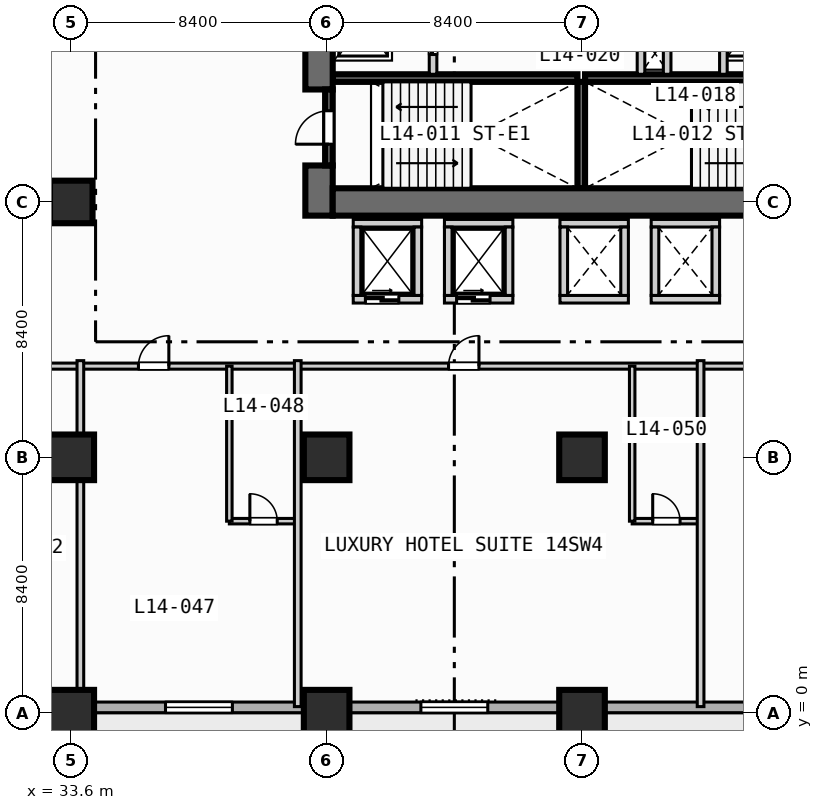
"""IFC4 building model, lengths in metres.
Left out: names, types, materials, properties, quantities, classifications, styles, units other than length and angle.
Written with IfcOpenShell. Run it as: python <this file> out.ifc"""

import sys

from ifc_helpers import new_model, si_unit, direction, frame, frame_2d, origin, origin_2d, place, context, subcontext, project, spatial, rectangle, extrude, element, fill, save


model = new_model("IFC4")
c1 = context("Model", 3, precision=1e-05, world=origin(), true_north=direction((0.0, 1.0)))
c2 = subcontext(c1, "Body", "Model", "MODEL_VIEW")
j1 = project(units=[si_unit("LENGTHUNIT", "METRE"), si_unit("PLANEANGLEUNIT", "RADIAN")], contexts=[c1])
p1 = place(None, origin())
s1 = spatial("IfcSite", under=j1, at=p1, CompositionType="ELEMENT")
p2 = place(p1, origin())
s2 = spatial("IfcBuilding", under=s1, at=p2, CompositionType="ELEMENT")
p3 = place(p2, frame((0.0, 0.0, 62.4)))
s3 = spatial("IfcBuildingStorey", under=s2, at=p3, CompositionType="ELEMENT", Elevation=62.4)
for number, where, z_axis, x_axis in (
    (1, (42.2, 20.875, 0.0), (0.0, 0.0, 1.0), (1.0, 0.0, 0.0)),
    (2, (50.5, 20.875, 0.0), (0.0, 0.0, 1.0), (1.0, 0.0, 0.0)),
):
    element("IfcWall", number, at=place(p3, frame(where, z_axis=z_axis, x_axis=x_axis)), inside=s3, PredefinedType="SOLIDWALL", context=c2, shape_type="SweptSolid", body=[
        extrude(rectangle(XDim=8.05, YDim=0.25, at=frame_2d((4.025, 0.0))), origin(), (0.0, 0.0, 1.0), 3.55),
    ])
p4 = place(p3, frame((50.375, 17.25, 0.0), z_axis=(0.0, 0.0, 1.0), x_axis=(0.0, 1.0, 0.0)))
e3 = element("IfcWall", 3, at=p4, inside=s3, PredefinedType="SOLIDWALL", context=c2, shape_type="SweptSolid", body=[
    extrude(rectangle(XDim=3.5, YDim=0.25, at=frame_2d((1.75, 0.0))), origin(), (0.0, 0.0, 1.0), 3.55),
])
p5 = place(p3, frame((41.75, 16.35, 0.0), z_axis=(0.0, 0.0, 1.0), x_axis=(0.0, 1.0, 0.0)))
e4 = element("IfcWall", 4, at=p5, inside=s3, PredefinedType="SHEAR", context=c2, shape_type="SweptSolid", body=[
    extrude(rectangle(XDim=1.65, YDim=0.9, at=frame_2d((0.825, 0.0))), origin(), (0.0, 0.0, 1.0), 3.55),
])
p6 = place(p3, frame((41.75, 20.5, 0.0), z_axis=(0.0, 0.0, 1.0), x_axis=(0.0, 1.0, 0.0)))
e5 = element("IfcWall", 5, at=p6, inside=s3, PredefinedType="SHEAR", context=c2, shape_type="SweptSolid", body=[
    extrude(rectangle(XDim=5.15, YDim=0.9, at=frame_2d((2.575, 0.0))), origin(), (0.0, 0.0, 1.0), 3.55),
])
p7 = place(p3, frame((42.2, 16.8, 0.0), z_axis=(0.0, 0.0, 1.0), x_axis=(1.0, 0.0, 0.0)))
e6 = element("IfcWall", 6, at=p7, inside=s3, PredefinedType="SHEAR", context=c2, shape_type="SweptSolid", body=[
    extrude(rectangle(XDim=16.35, YDim=0.9, at=frame_2d((8.175, 0.0))), origin(), (0.0, 0.0, 1.0), 3.55),
])
for number, where, z_axis, x_axis in (
    (7, (33.6, 0.0, 0.0), (0.0, 0.0, 1.0), (1.0, 0.0, 0.0)),
    (8, (33.6, 8.4, 0.0), (0.0, 0.0, 1.0), (1.0, 0.0, 0.0)),
):
    element("IfcColumn", number, at=place(p3, frame(where, z_axis=z_axis, x_axis=x_axis)), inside=s3, PredefinedType="COLUMN", context=c2, shape_type="SweptSolid", body=[
        extrude(rectangle(XDim=1.5, YDim=1.5, at=origin_2d()), origin(), (0.0, 0.0, 1.0), 3.8),
    ])
p8 = place(p3, frame((33.6, 16.8, 0.0), z_axis=(0.0, 0.0, 1.0), x_axis=(1.0, 0.0, 0.0)))
e9 = element("IfcColumn", 9, at=p8, inside=s3, PredefinedType="COLUMN", context=c2, shape_type="SweptSolid", body=[
    extrude(rectangle(XDim=1.4, YDim=1.4, at=origin_2d()), origin(), (0.0, 0.0, 1.0), 3.8),
])
for number, where, z_axis, x_axis in (
    (10, (42.0, 0.0, 0.0), (0.0, 0.0, 1.0), (1.0, 0.0, 0.0)),
    (11, (42.0, 8.4, 0.0), (0.0, 0.0, 1.0), (1.0, 0.0, 0.0)),
    (12, (50.4, 0.0, 0.0), (0.0, 0.0, 1.0), (1.0, 0.0, 0.0)),
    (13, (50.4, 8.4, 0.0), (0.0, 0.0, 1.0), (1.0, 0.0, 0.0)),
):
    element("IfcColumn", number, at=place(p3, frame(where, z_axis=z_axis, x_axis=x_axis)), inside=s3, PredefinedType="COLUMN", context=c2, shape_type="SweptSolid", body=[
        extrude(rectangle(XDim=1.5, YDim=1.5, at=origin_2d()), origin(), (0.0, 0.0, 1.0), 3.8),
    ])
p9 = place(p3, frame((89.225, 0.175, 0.0), z_axis=(0.0, 0.0, 1.0), x_axis=(-1.0, 0.0, 0.0)))
e14 = element("IfcWall", 14, at=p9, inside=s3, PredefinedType="STANDARD", context=c2, shape_type="SweptSolid", body=[
    extrude(rectangle(XDim=86.05, YDim=0.35, at=frame_2d((43.025, 0.0))), origin(), (0.0, 0.0, 1.0), 3.55),
])
p10 = place(p9, frame((69.025, 0.0, 0.0)))
e15 = element("IfcOpeningElement", 15, at=p10, cuts=e14, PredefinedType="OPENING", context=c2, shape_type="SweptSolid", body=[
    extrude(rectangle(XDim=1.4, YDim=2.2, at=frame_2d((0.7, 1.1))), frame((0.0, 0.185, 0.0), z_axis=(0.0, -1.0, 0.0), x_axis=(1.0, 0.0, 0.0)), (0.0, 0.0, 1.0), 0.37),
])
p11 = place(p9, frame((58.725, 0.0, 0.85)))
e16 = element("IfcOpeningElement", 16, at=p11, cuts=e14, PredefinedType="OPENING", context=c2, shape_type="SweptSolid", body=[
    extrude(rectangle(XDim=2.2, YDim=1.8, at=frame_2d((1.1, 0.9))), frame((0.0, 0.185, 0.0), z_axis=(0.0, -1.0, 0.0), x_axis=(1.0, 0.0, 0.0)), (0.0, 0.0, 1.0), 0.37),
])
p12 = place(p9, frame((50.325, 0.0, 0.85)))
e17 = element("IfcOpeningElement", 17, at=p12, cuts=e14, PredefinedType="OPENING", context=c2, shape_type="SweptSolid", body=[
    extrude(rectangle(XDim=2.2, YDim=1.8, at=frame_2d((1.1, 0.9))), frame((0.0, 0.185, 0.0), z_axis=(0.0, -1.0, 0.0), x_axis=(1.0, 0.0, 0.0)), (0.0, 0.0, 1.0), 0.37),
])
p13 = place(p9, frame((41.925, 0.0, 0.85)))
e18 = element("IfcOpeningElement", 18, at=p13, cuts=e14, PredefinedType="OPENING", context=c2, shape_type="SweptSolid", body=[
    extrude(rectangle(XDim=2.2, YDim=1.8, at=frame_2d((1.1, 0.9))), frame((0.0, 0.185, 0.0), z_axis=(0.0, -1.0, 0.0), x_axis=(1.0, 0.0, 0.0)), (0.0, 0.0, 1.0), 0.37),
])
p14 = place(p9, frame((27.775, 0.0, 0.85)))
e19 = element("IfcOpeningElement", 19, at=p14, cuts=e14, PredefinedType="OPENING", context=c2, shape_type="SweptSolid", body=[
    extrude(rectangle(XDim=1.8, YDim=1.8, at=frame_2d((0.9, 0.9))), frame((0.0, 0.185, 0.0), z_axis=(0.0, -1.0, 0.0), x_axis=(1.0, 0.0, 0.0)), (0.0, 0.0, 1.0), 0.37),
])
p15 = place(p3, frame((42.075, 18.0, 0.0), z_axis=(0.0, 0.0, 1.0), x_axis=(0.0, 1.0, 0.0)))
e20 = element("IfcWall", 20, at=p15, inside=s3, PredefinedType="SOLIDWALL", context=c2, shape_type="SweptSolid", body=[
    extrude(rectangle(XDim=2.5, YDim=0.25, at=frame_2d((1.25, 0.0))), origin(), (0.0, 0.0, 1.0), 3.55),
])
p16 = place(p15, frame((0.7, 0.0, 0.0)))
e21 = element("IfcOpeningElement", 21, at=p16, cuts=e20, PredefinedType="OPENING", context=c2, shape_type="SweptSolid", body=[
    extrude(rectangle(XDim=1.1, YDim=2.15, at=frame_2d((0.55, 1.075))), frame((0.0, 0.135, 0.0), z_axis=(0.0, -1.0, 0.0), x_axis=(1.0, 0.0, 0.0)), (0.0, 0.0, 1.0), 0.27),
])
p17 = place(p3, frame((45.5, 21.0, 0.0), z_axis=(0.0, 0.0, 1.0), x_axis=(0.0, 1.0, 0.0)))
e22 = element("IfcWall", 22, at=p17, inside=s3, PredefinedType="SOLIDWALL", context=c2, shape_type="SweptSolid", body=[
    extrude(rectangle(XDim=4.15, YDim=0.25, at=frame_2d((2.075, 0.0))), origin(), (0.0, 0.0, 1.0), 3.55),
])
p18 = place(p17, frame((0.65, 0.0, 0.0)))
e23 = element("IfcOpeningElement", 23, at=p18, cuts=e22, PredefinedType="OPENING", context=c2, shape_type="SweptSolid", body=[
    extrude(rectangle(XDim=1.1, YDim=2.15, at=frame_2d((0.55, 1.075))), frame((0.0, 0.135, 0.0), z_axis=(0.0, -1.0, 0.0), x_axis=(1.0, 0.0, 0.0)), (0.0, 0.0, 1.0), 0.27),
])
p19 = place(p3, frame((52.34, 21.0, 0.0), z_axis=(0.0, 0.0, 1.0), x_axis=(0.0, 1.0, 0.0)))
e24 = element("IfcWall", 24, at=p19, inside=s3, PredefinedType="SOLIDWALL", context=c2, shape_type="SweptSolid", body=[
    extrude(rectangle(XDim=3.75, YDim=0.25, at=frame_2d((1.875, 0.0))), origin(), (0.0, 0.0, 1.0), 3.55),
])
p20 = place(p3, frame((55.05, 21.0, 0.0), z_axis=(0.0, 0.0, 1.0), x_axis=(0.0, 1.0, 0.0)))
e25 = element("IfcWall", 25, at=p20, inside=s3, PredefinedType="SOLIDWALL", context=c2, shape_type="SweptSolid", body=[
    extrude(rectangle(XDim=4.15, YDim=0.25, at=frame_2d((2.075, 0.0))), origin(), (0.0, 0.0, 1.0), 3.55),
])
p21 = place(p20, frame((1.85, 0.0, 0.0)))
e26 = element("IfcOpeningElement", 26, at=p21, cuts=e25, PredefinedType="OPENING", context=c2, shape_type="SweptSolid", body=[
    extrude(rectangle(XDim=1.1, YDim=2.15, at=frame_2d((0.55, 1.075))), frame((0.0, 0.135, 0.0), z_axis=(0.0, -1.0, 0.0), x_axis=(1.0, 0.0, 0.0)), (0.0, 0.0, 1.0), 0.27),
])
p22 = place(p3, frame((53.2, 21.0, 0.0), z_axis=(0.0, 0.0, 1.0), x_axis=(0.0, 1.0, 0.0)))
e27 = element("IfcWall", 27, at=p22, inside=s3, PredefinedType="SOLIDWALL", context=c2, shape_type="SweptSolid", body=[
    extrude(rectangle(XDim=1.3, YDim=0.25, at=frame_2d((0.65, 0.0))), origin(), (0.0, 0.0, 1.0), 3.55),
])
p23 = place(p3, frame((42.875, 13.6, 0.0), z_axis=(0.0, 0.0, 1.0), x_axis=(1.0, 0.0, 0.0)))
e28 = element("IfcWall", 28, at=p23, inside=s3, PredefinedType="SOLIDWALL", context=c2, shape_type="SweptSolid", body=[
    extrude(rectangle(XDim=2.25, YDim=0.25, at=frame_2d((1.125, 0.0))), origin(), (0.0, 0.0, 1.0), 3.55),
])
p24 = place(p23, frame((0.4, 0.0, 0.0)))
e29 = element("IfcOpeningElement", 29, at=p24, cuts=e28, PredefinedType="OPENING", context=c2, shape_type="SweptSolid", body=[
    extrude(rectangle(XDim=1.1, YDim=2.15, at=frame_2d((0.55, 1.075))), frame((0.0, 0.135, 0.0), z_axis=(0.0, -1.0, 0.0), x_axis=(1.0, 0.0, 0.0)), (0.0, 0.0, 1.0), 0.27),
])
for number, where, z_axis, x_axis in (
    (30, (42.875, 16.1, 0.0), (0.0, 0.0, 1.0), (1.0, 0.0, 0.0)),
    (31, (43.0, 13.725, 0.0), (0.0, 0.0, 1.0), (0.0, 1.0, 0.0)),
    (32, (45.0, 13.725, 0.0), (0.0, 0.0, 1.0), (0.0, 1.0, 0.0)),
):
    element("IfcWall", number, at=place(p3, frame(where, z_axis=z_axis, x_axis=x_axis)), inside=s3, PredefinedType="SOLIDWALL", context=c2, shape_type="SweptSolid", body=[
        extrude(rectangle(XDim=2.25, YDim=0.25, at=frame_2d((1.125, 0.0))), origin(), (0.0, 0.0, 1.0), 3.55),
    ])
p25 = place(p3, frame((45.875, 13.6, 0.0), z_axis=(0.0, 0.0, 1.0), x_axis=(1.0, 0.0, 0.0)))
e33 = element("IfcWall", 33, at=p25, inside=s3, PredefinedType="SOLIDWALL", context=c2, shape_type="SweptSolid", body=[
    extrude(rectangle(XDim=2.25, YDim=0.25, at=frame_2d((1.125, 0.0))), origin(), (0.0, 0.0, 1.0), 3.55),
])
p26 = place(p25, frame((0.4, 0.0, 0.0)))
e34 = element("IfcOpeningElement", 34, at=p26, cuts=e33, PredefinedType="OPENING", context=c2, shape_type="SweptSolid", body=[
    extrude(rectangle(XDim=1.1, YDim=2.15, at=frame_2d((0.55, 1.075))), frame((0.0, 0.135, 0.0), z_axis=(0.0, -1.0, 0.0), x_axis=(1.0, 0.0, 0.0)), (0.0, 0.0, 1.0), 0.27),
])
for number, where, z_axis, x_axis in (
    (35, (45.875, 16.1, 0.0), (0.0, 0.0, 1.0), (1.0, 0.0, 0.0)),
    (36, (46.0, 13.725, 0.0), (0.0, 0.0, 1.0), (0.0, 1.0, 0.0)),
    (37, (48.0, 13.725, 0.0), (0.0, 0.0, 1.0), (0.0, 1.0, 0.0)),
    (38, (49.675, 13.6, 0.0), (0.0, 0.0, 1.0), (1.0, 0.0, 0.0)),
    (39, (49.675, 16.1, 0.0), (0.0, 0.0, 1.0), (1.0, 0.0, 0.0)),
    (40, (49.8, 13.725, 0.0), (0.0, 0.0, 1.0), (0.0, 1.0, 0.0)),
    (41, (51.8, 13.725, 0.0), (0.0, 0.0, 1.0), (0.0, 1.0, 0.0)),
    (42, (52.675, 13.6, 0.0), (0.0, 0.0, 1.0), (1.0, 0.0, 0.0)),
    (43, (52.675, 16.1, 0.0), (0.0, 0.0, 1.0), (1.0, 0.0, 0.0)),
    (44, (52.8, 13.725, 0.0), (0.0, 0.0, 1.0), (0.0, 1.0, 0.0)),
    (45, (54.8, 13.725, 0.0), (0.0, 0.0, 1.0), (0.0, 1.0, 0.0)),
):
    element("IfcWall", number, at=place(p3, frame(where, z_axis=z_axis, x_axis=x_axis)), inside=s3, PredefinedType="SOLIDWALL", context=c2, shape_type="SweptSolid", body=[
        extrude(rectangle(XDim=2.25, YDim=0.25, at=frame_2d((1.125, 0.0))), origin(), (0.0, 0.0, 1.0), 3.55),
    ])
p27 = place(p3, frame((13.5, 11.4, 0.0), z_axis=(0.0, 0.0, 1.0), x_axis=(1.0, 0.0, 0.0)))
e46 = element("IfcWall", 46, at=p27, inside=s3, PredefinedType="PARTITIONING", context=c2, shape_type="SweptSolid", body=[
    extrude(rectangle(XDim=50.3, YDim=0.2, at=frame_2d((25.15, 0.0))), origin(), (0.0, 0.0, 1.0), 3.55),
])
p28 = place(p27, frame((2.135, 0.0, 0.0)))
e47 = element("IfcOpeningElement", 47, at=p28, cuts=e46, PredefinedType="OPENING", context=c2, shape_type="SweptSolid", body=[
    extrude(rectangle(XDim=1.0, YDim=2.15, at=frame_2d((0.5, 1.075))), frame((0.0, 0.11, 0.0), z_axis=(0.0, -1.0, 0.0), x_axis=(1.0, 0.0, 0.0)), (0.0, 0.0, 1.0), 0.22),
])
p29 = place(p27, frame((14.665, 0.0, 0.0)))
e48 = element("IfcOpeningElement", 48, at=p29, cuts=e46, PredefinedType="OPENING", context=c2, shape_type="SweptSolid", body=[
    extrude(rectangle(XDim=1.0, YDim=2.15, at=frame_2d((0.5, 1.075))), frame((0.0, 0.11, 0.0), z_axis=(0.0, -1.0, 0.0), x_axis=(1.0, 0.0, 0.0)), (0.0, 0.0, 1.0), 0.22),
])
p30 = place(p27, frame((22.31, 0.0, 0.0)))
e49 = element("IfcOpeningElement", 49, at=p30, cuts=e46, PredefinedType="OPENING", context=c2, shape_type="SweptSolid", body=[
    extrude(rectangle(XDim=1.0, YDim=2.15, at=frame_2d((0.5, 1.075))), frame((0.0, 0.11, 0.0), z_axis=(0.0, -1.0, 0.0), x_axis=(1.0, 0.0, 0.0)), (0.0, 0.0, 1.0), 0.22),
])
p31 = place(p27, frame((32.51, 0.0, 0.0)))
e50 = element("IfcOpeningElement", 50, at=p31, cuts=e46, PredefinedType="OPENING", context=c2, shape_type="SweptSolid", body=[
    extrude(rectangle(XDim=1.0, YDim=2.15, at=frame_2d((0.5, 1.075))), frame((0.0, 0.11, 0.0), z_axis=(0.0, -1.0, 0.0), x_axis=(1.0, 0.0, 0.0)), (0.0, 0.0, 1.0), 0.22),
])
p32 = place(p27, frame((43.885, 0.0, 0.0)))
e51 = element("IfcOpeningElement", 51, at=p32, cuts=e46, PredefinedType="OPENING", context=c2, shape_type="SweptSolid", body=[
    extrude(rectangle(XDim=1.0, YDim=2.15, at=frame_2d((0.5, 1.075))), frame((0.0, 0.11, 0.0), z_axis=(0.0, -1.0, 0.0), x_axis=(1.0, 0.0, 0.0)), (0.0, 0.0, 1.0), 0.22),
])
p33 = place(p3, frame((33.9, 0.2, 0.0), z_axis=(0.0, 0.0, 1.0), x_axis=(0.0, 1.0, 0.0)))
e52 = element("IfcWall", 52, at=p33, inside=s3, PredefinedType="PARTITIONING", context=c2, shape_type="SweptSolid", body=[
    extrude(rectangle(XDim=11.38, YDim=0.22, at=frame_2d((5.69, 0.0))), origin(), (0.0, 0.0, 1.0), 2.8),
])
p34 = place(p3, frame((38.8, 6.3, 0.0), z_axis=(0.0, 0.0, 1.0), x_axis=(1.0, 0.0, 0.0)))
e53 = element("IfcWall", 53, at=p34, inside=s3, PredefinedType="PLUMBINGWALL", context=c2, shape_type="SweptSolid", body=[
    extrude(rectangle(XDim=2.25, YDim=0.18, at=frame_2d((1.125, 0.0))), origin(), (0.0, 0.0, 1.0), 3.55),
])
p35 = place(p34, frame((0.675, 0.0, 0.0)))
e54 = element("IfcOpeningElement", 54, at=p35, cuts=e53, PredefinedType="OPENING", context=c2, shape_type="SweptSolid", body=[
    extrude(rectangle(XDim=0.9, YDim=2.1, at=frame_2d((0.45, 1.05))), frame((0.0, 0.1, 0.0), z_axis=(0.0, -1.0, 0.0), x_axis=(1.0, 0.0, 0.0)), (0.0, 0.0, 1.0), 0.2),
])
p36 = place(p3, frame((38.8, 6.3, 0.0), z_axis=(0.0, 0.0, 1.0), x_axis=(0.0, 1.0, 0.0)))
e55 = element("IfcWall", 55, at=p36, inside=s3, PredefinedType="PLUMBINGWALL", context=c2, shape_type="SweptSolid", body=[
    extrude(rectangle(XDim=5.1, YDim=0.18, at=frame_2d((2.55, 0.0))), origin(), (0.0, 0.0, 1.0), 3.55),
])
p37 = place(p3, frame((41.05, 0.2, 0.0), z_axis=(0.0, 0.0, 1.0), x_axis=(0.0, 1.0, 0.0)))
e56 = element("IfcWall", 56, at=p37, inside=s3, PredefinedType="PARTITIONING", context=c2, shape_type="SweptSolid", body=[
    extrude(rectangle(XDim=11.38, YDim=0.22, at=frame_2d((5.69, 0.0))), origin(), (0.0, 0.0, 1.0), 3.55),
])
p38 = place(p3, frame((52.05, 6.3, 0.0), z_axis=(0.0, 0.0, 1.0), x_axis=(1.0, 0.0, 0.0)))
e57 = element("IfcWall", 57, at=p38, inside=s3, PredefinedType="PLUMBINGWALL", context=c2, shape_type="SweptSolid", body=[
    extrude(rectangle(XDim=2.25, YDim=0.18, at=frame_2d((1.125, 0.0))), origin(), (0.0, 0.0, 1.0), 3.55),
])
p39 = place(p38, frame((0.675, 0.0, 0.0)))
e58 = element("IfcOpeningElement", 58, at=p39, cuts=e57, PredefinedType="OPENING", context=c2, shape_type="SweptSolid", body=[
    extrude(rectangle(XDim=0.9, YDim=2.1, at=frame_2d((0.45, 1.05))), frame((0.0, 0.1, 0.0), z_axis=(0.0, -1.0, 0.0), x_axis=(1.0, 0.0, 0.0)), (0.0, 0.0, 1.0), 0.2),
])
p40 = place(p3, frame((52.05, 6.3, 0.0), z_axis=(0.0, 0.0, 1.0), x_axis=(0.0, 1.0, 0.0)))
e59 = element("IfcWall", 59, at=p40, inside=s3, PredefinedType="PLUMBINGWALL", context=c2, shape_type="SweptSolid", body=[
    extrude(rectangle(XDim=5.1, YDim=0.18, at=frame_2d((2.55, 0.0))), origin(), (0.0, 0.0, 1.0), 3.55),
])
p41 = place(p3, frame((54.3, 0.2, 0.0), z_axis=(0.0, 0.0, 1.0), x_axis=(0.0, 1.0, 0.0)))
e60 = element("IfcWall", 60, at=p41, inside=s3, PredefinedType="PARTITIONING", context=c2, shape_type="SweptSolid", body=[
    extrude(rectangle(XDim=11.38, YDim=0.22, at=frame_2d((5.69, 0.0))), origin(), (0.0, 0.0, 1.0), 3.55),
])
p42 = place(p12, origin())
e61 = element("IfcWindow", 61, at=p42, inside=s3, PartitioningType="SINGLE_PANEL", PredefinedType="WINDOW", context=c2, shape_type="SweptSolid", body=[
    extrude(rectangle(XDim=2.2, YDim=1.8, at=frame_2d((1.1, 0.9))), frame((0.0, 0.03, 0.0), z_axis=(0.0, -1.0, 0.0), x_axis=(1.0, 0.0, 0.0)), (0.0, 0.0, 1.0), 0.06),
])
fill(e17, e61)
p43 = place(p13, origin())
e62 = element("IfcWindow", 62, at=p43, inside=s3, PartitioningType="SINGLE_PANEL", PredefinedType="WINDOW", context=c2, shape_type="SweptSolid", body=[
    extrude(rectangle(XDim=2.2, YDim=1.8, at=frame_2d((1.1, 0.9))), frame((0.0, 0.03, 0.0), z_axis=(0.0, -1.0, 0.0), x_axis=(1.0, 0.0, 0.0)), (0.0, 0.0, 1.0), 0.06),
])
fill(e18, e62)
p44 = place(p16, origin())
e63 = element("IfcDoor", 63, at=p44, inside=s3, OperationType="SINGLE_SWING_LEFT", PredefinedType="DOOR", context=c2, shape_type="SweptSolid", body=[
    extrude(rectangle(XDim=1.1, YDim=2.15, at=frame_2d((0.55, 1.075))), frame((0.0, 0.025, 0.0), z_axis=(0.0, -1.0, 0.0), x_axis=(1.0, 0.0, 0.0)), (0.0, 0.0, 1.0), 0.05),
])
fill(e21, e63)
p45 = place(p18, origin())
e64 = element("IfcDoor", 64, at=p45, inside=s3, OperationType="SLIDING_TO_LEFT", PredefinedType="DOOR", context=c2, shape_type="SweptSolid", body=[
    extrude(rectangle(XDim=1.1, YDim=2.15, at=frame_2d((0.55, 1.075))), frame((0.0, 0.025, 0.0), z_axis=(0.0, -1.0, 0.0), x_axis=(1.0, 0.0, 0.0)), (0.0, 0.0, 1.0), 0.05),
])
fill(e23, e64)
p46 = place(p24, origin())
e65 = element("IfcDoor", 65, at=p46, inside=s3, OperationType="SLIDING_TO_LEFT", PredefinedType="DOOR", context=c2, shape_type="SweptSolid", body=[
    extrude(rectangle(XDim=1.1, YDim=2.15, at=frame_2d((0.55, 1.075))), frame((0.0, 0.025, 0.0), z_axis=(0.0, -1.0, 0.0), x_axis=(1.0, 0.0, 0.0)), (0.0, 0.0, 1.0), 0.05),
])
fill(e29, e65)
p47 = place(p26, origin())
e66 = element("IfcDoor", 66, at=p47, inside=s3, OperationType="SLIDING_TO_LEFT", PredefinedType="DOOR", context=c2, shape_type="SweptSolid", body=[
    extrude(rectangle(XDim=1.1, YDim=2.15, at=frame_2d((0.55, 1.075))), frame((0.0, 0.025, 0.0), z_axis=(0.0, -1.0, 0.0), x_axis=(1.0, 0.0, 0.0)), (0.0, 0.0, 1.0), 0.05),
])
fill(e34, e66)
p48 = place(p30, origin())
e67 = element("IfcDoor", 67, at=p48, inside=s3, OperationType="SINGLE_SWING_RIGHT", PredefinedType="DOOR", context=c2, shape_type="SweptSolid", body=[
    extrude(rectangle(XDim=1.0, YDim=2.15, at=frame_2d((0.5, 1.075))), frame((0.0, 0.025, 0.0), z_axis=(0.0, -1.0, 0.0), x_axis=(1.0, 0.0, 0.0)), (0.0, 0.0, 1.0), 0.05),
])
fill(e49, e67)
p49 = place(p31, origin())
e68 = element("IfcDoor", 68, at=p49, inside=s3, OperationType="SINGLE_SWING_RIGHT", PredefinedType="DOOR", context=c2, shape_type="SweptSolid", body=[
    extrude(rectangle(XDim=1.0, YDim=2.15, at=frame_2d((0.5, 1.075))), frame((0.0, 0.025, 0.0), z_axis=(0.0, -1.0, 0.0), x_axis=(1.0, 0.0, 0.0)), (0.0, 0.0, 1.0), 0.05),
])
fill(e50, e68)
p50 = place(p35, origin())
e69 = element("IfcDoor", 69, at=p50, inside=s3, OperationType="SINGLE_SWING_LEFT", PredefinedType="DOOR", context=c2, shape_type="SweptSolid", body=[
    extrude(rectangle(XDim=0.9, YDim=2.1, at=frame_2d((0.45, 1.05))), frame((0.0, 0.025, 0.0), z_axis=(0.0, -1.0, 0.0), x_axis=(1.0, 0.0, 0.0)), (0.0, 0.0, 1.0), 0.05),
])
fill(e54, e69)
p51 = place(p39, origin())
e70 = element("IfcDoor", 70, at=p51, inside=s3, OperationType="SINGLE_SWING_LEFT", PredefinedType="DOOR", context=c2, shape_type="SweptSolid", body=[
    extrude(rectangle(XDim=0.9, YDim=2.1, at=frame_2d((0.45, 1.05))), frame((0.0, 0.025, 0.0), z_axis=(0.0, -1.0, 0.0), x_axis=(1.0, 0.0, 0.0)), (0.0, 0.0, 1.0), 0.05),
])
fill(e58, e70)
save(model, sys.argv[1])
